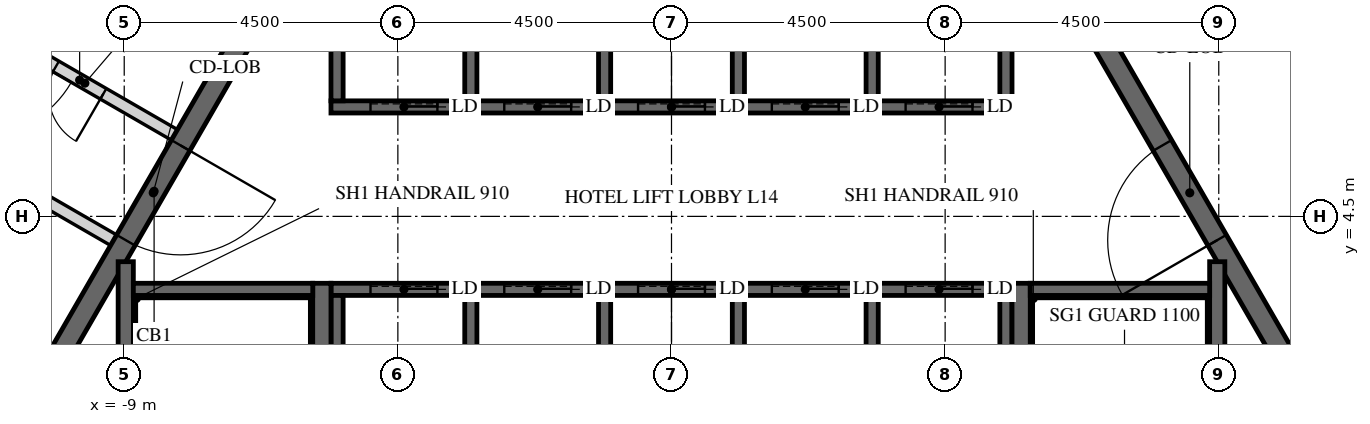
"""IFC4 building model, lengths in metres.
Left out: names, types, materials, properties, quantities, classifications, styles, units other than length and angle.
Written with IfcOpenShell. Run it as: python <this file> out.ifc"""

import sys

from ifc_helpers import new_model, si_unit, direction, frame, frame_2d, origin, place, context, subcontext, project, spatial, polyline, rectangle, outline, extrude, element, fill, save


model = new_model("IFC4")
c1 = context("Model", 3, precision=1e-05, world=origin(), true_north=direction((0.0, 1.0)))
c2 = subcontext(c1, "Body", "Model", "MODEL_VIEW")
j1 = project(units=[si_unit("LENGTHUNIT", "METRE"), si_unit("PLANEANGLEUNIT", "RADIAN")], contexts=[c1])
p1 = place(None, origin())
s1 = spatial("IfcSite", under=j1, at=p1, CompositionType="ELEMENT")
p2 = place(p1, origin())
s2 = spatial("IfcBuilding", under=s1, at=p2, CompositionType="ELEMENT")
p3 = place(p2, frame((0.0, 0.0, 68.7)))
s3 = spatial("IfcBuildingStorey", under=s2, at=p3, CompositionType="ELEMENT", Elevation=68.7)
p4 = place(p3, frame((-7.91, 13.7, -0.15), z_axis=(0.0, 0.0, 1.0), x_axis=(-0.499999880136, -0.866025472988, 0.0)))
e1 = element("IfcWall", 1, at=p4, inside=s3, PredefinedType="SHEAR", context=c2, shape_type="SweptSolid", body=[
    extrude(outline(polyline([(-0.173, -0.3), (15.993, -0.3), (15.646, 0.3), (0.173, 0.3), (-0.173, -0.3)])), origin(), (0.0, 0.0, 1.0), 3.9),
])
p5 = place(p4, frame((7.039, 0.0, 0.15)))
e2 = element("IfcOpeningElement", 2, at=p5, cuts=e1, PredefinedType="OPENING", context=c2, shape_type="SweptSolid", body=[
    extrude(rectangle(XDim=1.8, YDim=2.4, at=frame_2d((0.9, 1.2))), frame((0.0, 0.31, 0.0), z_axis=(0.0, -1.0, 0.0), x_axis=(1.0, 0.0, 0.0)), (0.0, 0.0, 1.0), 0.62),
])
p6 = place(p3, frame((15.819, 0.0, -0.15), z_axis=(0.0, 0.0, 1.0), x_axis=(-0.499999880136, 0.866025472988, 0.0)))
e3 = element("IfcWall", 3, at=p6, inside=s3, PredefinedType="SHEAR", context=c2, shape_type="SweptSolid", body=[
    extrude(outline(polyline([(-0.173, -0.3), (15.993, -0.3), (15.646, 0.3), (0.173, 0.3), (-0.173, -0.3)])), origin(), (0.0, 0.0, 1.0), 3.9),
])
p7 = place(p6, frame((6.981, 0.0, 0.15)))
e4 = element("IfcOpeningElement", 4, at=p7, cuts=e3, PredefinedType="OPENING", context=c2, shape_type="SweptSolid", body=[
    extrude(rectangle(XDim=1.8, YDim=2.4, at=frame_2d((0.9, 1.2))), frame((0.0, 0.31, 0.0), z_axis=(0.0, -1.0, 0.0), x_axis=(1.0, 0.0, 0.0)), (0.0, 0.0, 1.0), 0.62),
])
p8 = place(p3, frame((-5.673, 9.825, -0.15), z_axis=(0.0, 0.0, 1.0), x_axis=(-0.499995046907, -0.866028263435, 0.0)))
e5 = element("IfcWall", 5, at=p8, inside=s3, PredefinedType="SHEAR", context=c2, shape_type="SweptSolid", body=[
    extrude(outline(polyline([(-0.101, -0.175), (11.446, -0.175), (11.244, 0.175), (0.101, 0.175), (-0.101, -0.175)])), origin(), (0.0, 0.0, 1.0), 3.9),
])
p9 = place(p8, frame((4.801, 0.0, 0.15)))
e6 = element("IfcOpeningElement", 6, at=p9, cuts=e5, PredefinedType="OPENING", context=c2, shape_type="SweptSolid", body=[
    extrude(rectangle(XDim=1.8, YDim=2.4, at=frame_2d((0.9, 1.2))), frame((0.0, 0.185, 0.0), z_axis=(0.0, -1.0, 0.0), x_axis=(1.0, 0.0, 0.0)), (0.0, 0.0, 1.0), 0.37),
])
p10 = place(p3, frame((11.345, 0.0, -0.15), z_axis=(0.0, 0.0, 1.0), x_axis=(-0.499995046907, 0.866028263435, 0.0)))
e7 = element("IfcWall", 7, at=p10, inside=s3, PredefinedType="SHEAR", context=c2, shape_type="SweptSolid", body=[
    extrude(outline(polyline([(-0.101, -0.175), (11.446, -0.175), (11.244, 0.175), (0.101, 0.175), (-0.101, -0.175)])), origin(), (0.0, 0.0, 1.0), 3.9),
])
p11 = place(p10, frame((4.744, 0.0, 0.15)))
e8 = element("IfcOpeningElement", 8, at=p11, cuts=e7, PredefinedType="OPENING", context=c2, shape_type="SweptSolid", body=[
    extrude(rectangle(XDim=1.8, YDim=2.4, at=frame_2d((0.9, 1.2))), frame((0.0, 0.185, 0.0), z_axis=(0.0, -1.0, 0.0), x_axis=(1.0, 0.0, 0.0)), (0.0, 0.0, 1.0), 0.37),
])
p12 = place(p3, frame((-5.6, 6.3, -0.25), z_axis=(0.0, 0.0, 1.0), x_axis=(1.0, 0.0, 0.0)))
e9 = element("IfcWall", 9, at=p12, inside=s3, PredefinedType="SHEAR", context=c2, shape_type="SweptSolid", body=[
    extrude(rectangle(XDim=11.2, YDim=0.2, at=frame_2d((5.6, 0.0))), origin(), (0.0, 0.0, 1.0), 3.9),
])
p13 = place(p12, frame((0.65, 0.0, 0.25)))
e10 = element("IfcOpeningElement", 10, at=p13, cuts=e9, PredefinedType="OPENING", context=c2, shape_type="SweptSolid", body=[
    extrude(rectangle(XDim=1.1, YDim=2.1, at=frame_2d((0.55, 1.05))), frame((0.0, 0.11, 0.0), z_axis=(0.0, -1.0, 0.0), x_axis=(1.0, 0.0, 0.0)), (0.0, 0.0, 1.0), 0.22),
])
p14 = place(p12, frame((2.85, 0.0, 0.25)))
e11 = element("IfcOpeningElement", 11, at=p14, cuts=e9, PredefinedType="OPENING", context=c2, shape_type="SweptSolid", body=[
    extrude(rectangle(XDim=1.1, YDim=2.1, at=frame_2d((0.55, 1.05))), frame((0.0, 0.11, 0.0), z_axis=(0.0, -1.0, 0.0), x_axis=(1.0, 0.0, 0.0)), (0.0, 0.0, 1.0), 0.22),
])
p15 = place(p12, frame((5.05, 0.0, 0.25)))
e12 = element("IfcOpeningElement", 12, at=p15, cuts=e9, PredefinedType="OPENING", context=c2, shape_type="SweptSolid", body=[
    extrude(rectangle(XDim=1.1, YDim=2.1, at=frame_2d((0.55, 1.05))), frame((0.0, 0.11, 0.0), z_axis=(0.0, -1.0, 0.0), x_axis=(1.0, 0.0, 0.0)), (0.0, 0.0, 1.0), 0.22),
])
p16 = place(p12, frame((7.25, 0.0, 0.25)))
e13 = element("IfcOpeningElement", 13, at=p16, cuts=e9, PredefinedType="OPENING", context=c2, shape_type="SweptSolid", body=[
    extrude(rectangle(XDim=1.1, YDim=2.1, at=frame_2d((0.55, 1.05))), frame((0.0, 0.11, 0.0), z_axis=(0.0, -1.0, 0.0), x_axis=(1.0, 0.0, 0.0)), (0.0, 0.0, 1.0), 0.22),
])
p17 = place(p12, frame((9.45, 0.0, 0.25)))
e14 = element("IfcOpeningElement", 14, at=p17, cuts=e9, PredefinedType="OPENING", context=c2, shape_type="SweptSolid", body=[
    extrude(rectangle(XDim=1.1, YDim=2.1, at=frame_2d((0.55, 1.05))), frame((0.0, 0.11, 0.0), z_axis=(0.0, -1.0, 0.0), x_axis=(1.0, 0.0, 0.0)), (0.0, 0.0, 1.0), 0.22),
])
for number, where, z_axis, x_axis in (
    (15, (-5.5, 6.4, -0.25), (0.0, 0.0, 1.0), (0.0, 1.0, 0.0)),
    (16, (-3.3, 6.4, -0.25), (0.0, 0.0, 1.0), (0.0, 1.0, 0.0)),
    (17, (-1.1, 6.4, -0.25), (0.0, 0.0, 1.0), (0.0, 1.0, 0.0)),
    (18, (1.1, 6.4, -0.25), (0.0, 0.0, 1.0), (0.0, 1.0, 0.0)),
    (19, (3.3, 6.4, -0.25), (0.0, 0.0, 1.0), (0.0, 1.0, 0.0)),
    (20, (5.5, 6.4, -0.25), (0.0, 0.0, 1.0), (0.0, 1.0, 0.0)),
):
    element("IfcWall", number, at=place(p3, frame(where, z_axis=z_axis, x_axis=x_axis)), inside=s3, PredefinedType="SHEAR", context=c2, shape_type="SweptSolid", body=[
        extrude(rectangle(XDim=2.9, YDim=0.2, at=frame_2d((1.45, 0.0))), origin(), (0.0, 0.0, 1.0), 3.9),
    ])
p18 = place(p3, frame((-5.6, 3.3, -0.25), z_axis=(0.0, 0.0, 1.0), x_axis=(1.0, 0.0, 0.0)))
e21 = element("IfcWall", 21, at=p18, inside=s3, PredefinedType="SHEAR", context=c2, shape_type="SweptSolid", body=[
    extrude(rectangle(XDim=11.2, YDim=0.2, at=frame_2d((5.6, 0.0))), origin(), (0.0, 0.0, 1.0), 3.9),
])
p19 = place(p18, frame((0.65, 0.0, 0.25)))
e22 = element("IfcOpeningElement", 22, at=p19, cuts=e21, PredefinedType="OPENING", context=c2, shape_type="SweptSolid", body=[
    extrude(rectangle(XDim=1.1, YDim=2.1, at=frame_2d((0.55, 1.05))), frame((0.0, 0.11, 0.0), z_axis=(0.0, -1.0, 0.0), x_axis=(1.0, 0.0, 0.0)), (0.0, 0.0, 1.0), 0.22),
])
p20 = place(p18, frame((2.85, 0.0, 0.25)))
e23 = element("IfcOpeningElement", 23, at=p20, cuts=e21, PredefinedType="OPENING", context=c2, shape_type="SweptSolid", body=[
    extrude(rectangle(XDim=1.1, YDim=2.1, at=frame_2d((0.55, 1.05))), frame((0.0, 0.11, 0.0), z_axis=(0.0, -1.0, 0.0), x_axis=(1.0, 0.0, 0.0)), (0.0, 0.0, 1.0), 0.22),
])
p21 = place(p18, frame((5.05, 0.0, 0.25)))
e24 = element("IfcOpeningElement", 24, at=p21, cuts=e21, PredefinedType="OPENING", context=c2, shape_type="SweptSolid", body=[
    extrude(rectangle(XDim=1.1, YDim=2.1, at=frame_2d((0.55, 1.05))), frame((0.0, 0.11, 0.0), z_axis=(0.0, -1.0, 0.0), x_axis=(1.0, 0.0, 0.0)), (0.0, 0.0, 1.0), 0.22),
])
p22 = place(p18, frame((7.25, 0.0, 0.25)))
e25 = element("IfcOpeningElement", 25, at=p22, cuts=e21, PredefinedType="OPENING", context=c2, shape_type="SweptSolid", body=[
    extrude(rectangle(XDim=1.1, YDim=2.1, at=frame_2d((0.55, 1.05))), frame((0.0, 0.11, 0.0), z_axis=(0.0, -1.0, 0.0), x_axis=(1.0, 0.0, 0.0)), (0.0, 0.0, 1.0), 0.22),
])
p23 = place(p18, frame((9.45, 0.0, 0.25)))
e26 = element("IfcOpeningElement", 26, at=p23, cuts=e21, PredefinedType="OPENING", context=c2, shape_type="SweptSolid", body=[
    extrude(rectangle(XDim=1.1, YDim=2.1, at=frame_2d((0.55, 1.05))), frame((0.0, 0.11, 0.0), z_axis=(0.0, -1.0, 0.0), x_axis=(1.0, 0.0, 0.0)), (0.0, 0.0, 1.0), 0.22),
])
for number, where, z_axis, x_axis in (
    (27, (-5.5, 0.1, -0.25), (0.0, 0.0, 1.0), (0.0, 1.0, 0.0)),
    (28, (-3.3, 0.1, -0.25), (0.0, 0.0, 1.0), (0.0, 1.0, 0.0)),
    (29, (-1.1, 0.1, -0.25), (0.0, 0.0, 1.0), (0.0, 1.0, 0.0)),
    (30, (1.1, 0.1, -0.25), (0.0, 0.0, 1.0), (0.0, 1.0, 0.0)),
    (31, (3.3, 0.1, -0.25), (0.0, 0.0, 1.0), (0.0, 1.0, 0.0)),
    (32, (5.5, 0.1, -0.25), (0.0, 0.0, 1.0), (0.0, 1.0, 0.0)),
):
    element("IfcWall", number, at=place(p3, frame(where, z_axis=z_axis, x_axis=x_axis)), inside=s3, PredefinedType="SHEAR", context=c2, shape_type="SweptSolid", body=[
        extrude(rectangle(XDim=3.1, YDim=0.2, at=frame_2d((1.55, 0.0))), origin(), (0.0, 0.0, 1.0), 3.9),
    ])
p24 = place(p3, frame((-9.175, 4.109, 0.0), z_axis=(0.0, 0.0, 1.0), x_axis=(-0.865989465428, 0.500062241894, 0.0)))
e33 = element("IfcWall", 33, at=p24, inside=s3, PredefinedType="PARTITIONING", context=c2, shape_type="SweptSolid", body=[
    extrude(rectangle(XDim=3.4, YDim=0.2, at=frame_2d((1.7, 0.0))), origin(), (0.0, 0.0, 1.0), 3.65),
])
p25 = place(p24, frame((1.351, 0.0, 0.0)))
e34 = element("IfcOpeningElement", 34, at=p25, cuts=e33, PredefinedType="OPENING", context=c2, shape_type="SweptSolid", body=[
    extrude(rectangle(XDim=0.9, YDim=2.1, at=frame_2d((0.45, 1.05))), frame((0.0, 0.11, 0.0), z_axis=(0.0, -1.0, 0.0), x_axis=(1.0, 0.0, 0.0)), (0.0, 0.0, 1.0), 0.22),
])
p26 = place(p3, frame((-8.175, 5.841, 0.0), z_axis=(0.0, 0.0, 1.0), x_axis=(-0.866020560687, 0.500008388397, 0.0)))
e35 = element("IfcWall", 35, at=p26, inside=s3, PredefinedType="PARTITIONING", context=c2, shape_type="SweptSolid", body=[
    extrude(rectangle(XDim=3.4, YDim=0.2, at=frame_2d((1.7, 0.0))), origin(), (0.0, 0.0, 1.0), 3.65),
])
p27 = place(p26, frame((1.35, 0.0, 0.0)))
e36 = element("IfcOpeningElement", 36, at=p27, cuts=e35, PredefinedType="OPENING", context=c2, shape_type="SweptSolid", body=[
    extrude(rectangle(XDim=0.9, YDim=2.1, at=frame_2d((0.45, 1.05))), frame((0.0, 0.11, 0.0), z_axis=(0.0, -1.0, 0.0), x_axis=(1.0, 0.0, 0.0)), (0.0, 0.0, 1.0), 0.22),
])
p28 = place(p3, frame((5.75, -3.4, -0.25), z_axis=(0.0, 0.0, 1.0), x_axis=(0.0, 1.0, 0.0)))
e37 = element("IfcWall", 37, at=p28, inside=s3, PredefinedType="SHEAR", context=c2, shape_type="SweptSolid", body=[
    extrude(rectangle(XDim=6.8, YDim=0.3, at=frame_2d((3.4, 0.0))), origin(), (0.0, 0.0, 1.0), 3.9),
])
p29 = place(p3, frame((8.975, -3.755, -0.25), z_axis=(0.0, 0.0, 1.0), x_axis=(0.0, 1.0, 0.0)))
e38 = element("IfcWall", 38, at=p29, inside=s3, PredefinedType="SHEAR", context=c2, shape_type="SweptSolid", body=[
    extrude(rectangle(XDim=7.51, YDim=0.25, at=frame_2d((3.755, 0.0))), origin(), (0.0, 0.0, 1.0), 3.9),
])
p30 = place(p3, frame((5.9, 3.3, -0.25), z_axis=(0.0, 0.0, 1.0), x_axis=(1.0, 0.0, 0.0)))
e39 = element("IfcWall", 39, at=p30, inside=s3, PredefinedType="SHEAR", context=c2, shape_type="SweptSolid", body=[
    extrude(rectangle(XDim=2.95, YDim=0.2, at=frame_2d((1.475, 0.0))), origin(), (0.0, 0.0, 1.0), 3.9),
])
p31 = place(p3, frame((-5.75, -3.4, -0.25), z_axis=(0.0, 0.0, 1.0), x_axis=(0.0, 1.0, 0.0)))
e40 = element("IfcWall", 40, at=p31, inside=s3, PredefinedType="SHEAR", context=c2, shape_type="SweptSolid", body=[
    extrude(rectangle(XDim=6.8, YDim=0.3, at=frame_2d((3.4, 0.0))), origin(), (0.0, 0.0, 1.0), 3.9),
])
p32 = place(p3, frame((-8.975, -3.755, -0.25), z_axis=(0.0, 0.0, 1.0), x_axis=(0.0, 1.0, 0.0)))
e41 = element("IfcWall", 41, at=p32, inside=s3, PredefinedType="SHEAR", context=c2, shape_type="SweptSolid", body=[
    extrude(rectangle(XDim=7.51, YDim=0.25, at=frame_2d((3.755, 0.0))), origin(), (0.0, 0.0, 1.0), 3.9),
])
p33 = place(p3, frame((-8.85, 3.3, -0.25), z_axis=(0.0, 0.0, 1.0), x_axis=(1.0, 0.0, 0.0)))
e42 = element("IfcWall", 42, at=p33, inside=s3, PredefinedType="SHEAR", context=c2, shape_type="SweptSolid", body=[
    extrude(rectangle(XDim=2.95, YDim=0.2, at=frame_2d((1.475, 0.0))), origin(), (0.0, 0.0, 1.0), 3.9),
])
p34 = place(p9, origin())
e43 = element("IfcDoor", 43, at=p34, inside=s3, OperationType="DOUBLE_DOOR_SINGLE_SWING", PredefinedType="DOOR", context=c2, shape_type="SweptSolid", body=[
    extrude(rectangle(XDim=1.8, YDim=2.4, at=frame_2d((0.9, 1.2))), frame((0.0, 0.025, 0.0), z_axis=(0.0, -1.0, 0.0), x_axis=(1.0, 0.0, 0.0)), (0.0, 0.0, 1.0), 0.05),
])
fill(e6, e43)
p35 = place(p11, origin())
e44 = element("IfcDoor", 44, at=p35, inside=s3, OperationType="DOUBLE_DOOR_SINGLE_SWING", PredefinedType="DOOR", context=c2, shape_type="SweptSolid", body=[
    extrude(rectangle(XDim=1.8, YDim=2.4, at=frame_2d((0.9, 1.2))), frame((0.0, 0.025, 0.0), z_axis=(0.0, -1.0, 0.0), x_axis=(1.0, 0.0, 0.0)), (0.0, 0.0, 1.0), 0.05),
])
fill(e8, e44)
p36 = place(p27, origin())
e45 = element("IfcDoor", 45, at=p36, inside=s3, OperationType="SINGLE_SWING_LEFT", PredefinedType="DOOR", context=c2, shape_type="SweptSolid", body=[
    extrude(rectangle(XDim=0.9, YDim=2.1, at=frame_2d((0.45, 1.05))), frame((0.0, 0.025, 0.0), z_axis=(0.0, -1.0, 0.0), x_axis=(1.0, 0.0, 0.0)), (0.0, 0.0, 1.0), 0.05),
])
fill(e36, e45)
p37 = place(p13, origin())
e46 = element("IfcDoor", 46, at=p37, inside=s3, OperationType="SLIDING_TO_LEFT", PredefinedType="DOOR", context=c2, shape_type="SweptSolid", body=[
    extrude(rectangle(XDim=1.1, YDim=2.1, at=frame_2d((0.55, 1.05))), frame((0.0, 0.025, 0.0), z_axis=(0.0, -1.0, 0.0), x_axis=(1.0, 0.0, 0.0)), (0.0, 0.0, 1.0), 0.05),
])
fill(e10, e46)
p38 = place(p14, origin())
e47 = element("IfcDoor", 47, at=p38, inside=s3, OperationType="SLIDING_TO_LEFT", PredefinedType="DOOR", context=c2, shape_type="SweptSolid", body=[
    extrude(rectangle(XDim=1.1, YDim=2.1, at=frame_2d((0.55, 1.05))), frame((0.0, 0.025, 0.0), z_axis=(0.0, -1.0, 0.0), x_axis=(1.0, 0.0, 0.0)), (0.0, 0.0, 1.0), 0.05),
])
fill(e11, e47)
p39 = place(p15, origin())
e48 = element("IfcDoor", 48, at=p39, inside=s3, OperationType="SLIDING_TO_LEFT", PredefinedType="DOOR", context=c2, shape_type="SweptSolid", body=[
    extrude(rectangle(XDim=1.1, YDim=2.1, at=frame_2d((0.55, 1.05))), frame((0.0, 0.025, 0.0), z_axis=(0.0, -1.0, 0.0), x_axis=(1.0, 0.0, 0.0)), (0.0, 0.0, 1.0), 0.05),
])
fill(e12, e48)
p40 = place(p16, origin())
e49 = element("IfcDoor", 49, at=p40, inside=s3, OperationType="SLIDING_TO_LEFT", PredefinedType="DOOR", context=c2, shape_type="SweptSolid", body=[
    extrude(rectangle(XDim=1.1, YDim=2.1, at=frame_2d((0.55, 1.05))), frame((0.0, 0.025, 0.0), z_axis=(0.0, -1.0, 0.0), x_axis=(1.0, 0.0, 0.0)), (0.0, 0.0, 1.0), 0.05),
])
fill(e13, e49)
p41 = place(p17, origin())
e50 = element("IfcDoor", 50, at=p41, inside=s3, OperationType="SLIDING_TO_LEFT", PredefinedType="DOOR", context=c2, shape_type="SweptSolid", body=[
    extrude(rectangle(XDim=1.1, YDim=2.1, at=frame_2d((0.55, 1.05))), frame((0.0, 0.025, 0.0), z_axis=(0.0, -1.0, 0.0), x_axis=(1.0, 0.0, 0.0)), (0.0, 0.0, 1.0), 0.05),
])
fill(e14, e50)
p42 = place(p19, origin())
e51 = element("IfcDoor", 51, at=p42, inside=s3, OperationType="SLIDING_TO_LEFT", PredefinedType="DOOR", context=c2, shape_type="SweptSolid", body=[
    extrude(rectangle(XDim=1.1, YDim=2.1, at=frame_2d((0.55, 1.05))), frame((0.0, 0.025, 0.0), z_axis=(0.0, -1.0, 0.0), x_axis=(1.0, 0.0, 0.0)), (0.0, 0.0, 1.0), 0.05),
])
fill(e22, e51)
p43 = place(p20, origin())
e52 = element("IfcDoor", 52, at=p43, inside=s3, OperationType="SLIDING_TO_LEFT", PredefinedType="DOOR", context=c2, shape_type="SweptSolid", body=[
    extrude(rectangle(XDim=1.1, YDim=2.1, at=frame_2d((0.55, 1.05))), frame((0.0, 0.025, 0.0), z_axis=(0.0, -1.0, 0.0), x_axis=(1.0, 0.0, 0.0)), (0.0, 0.0, 1.0), 0.05),
])
fill(e23, e52)
p44 = place(p21, origin())
e53 = element("IfcDoor", 53, at=p44, inside=s3, OperationType="SLIDING_TO_LEFT", PredefinedType="DOOR", context=c2, shape_type="SweptSolid", body=[
    extrude(rectangle(XDim=1.1, YDim=2.1, at=frame_2d((0.55, 1.05))), frame((0.0, 0.025, 0.0), z_axis=(0.0, -1.0, 0.0), x_axis=(1.0, 0.0, 0.0)), (0.0, 0.0, 1.0), 0.05),
])
fill(e24, e53)
p45 = place(p22, origin())
e54 = element("IfcDoor", 54, at=p45, inside=s3, OperationType="SLIDING_TO_LEFT", PredefinedType="DOOR", context=c2, shape_type="SweptSolid", body=[
    extrude(rectangle(XDim=1.1, YDim=2.1, at=frame_2d((0.55, 1.05))), frame((0.0, 0.025, 0.0), z_axis=(0.0, -1.0, 0.0), x_axis=(1.0, 0.0, 0.0)), (0.0, 0.0, 1.0), 0.05),
])
fill(e25, e54)
p46 = place(p23, origin())
e55 = element("IfcDoor", 55, at=p46, inside=s3, OperationType="SLIDING_TO_LEFT", PredefinedType="DOOR", context=c2, shape_type="SweptSolid", body=[
    extrude(rectangle(XDim=1.1, YDim=2.1, at=frame_2d((0.55, 1.05))), frame((0.0, 0.025, 0.0), z_axis=(0.0, -1.0, 0.0), x_axis=(1.0, 0.0, 0.0)), (0.0, 0.0, 1.0), 0.05),
])
fill(e26, e55)
save(model, sys.argv[1])
